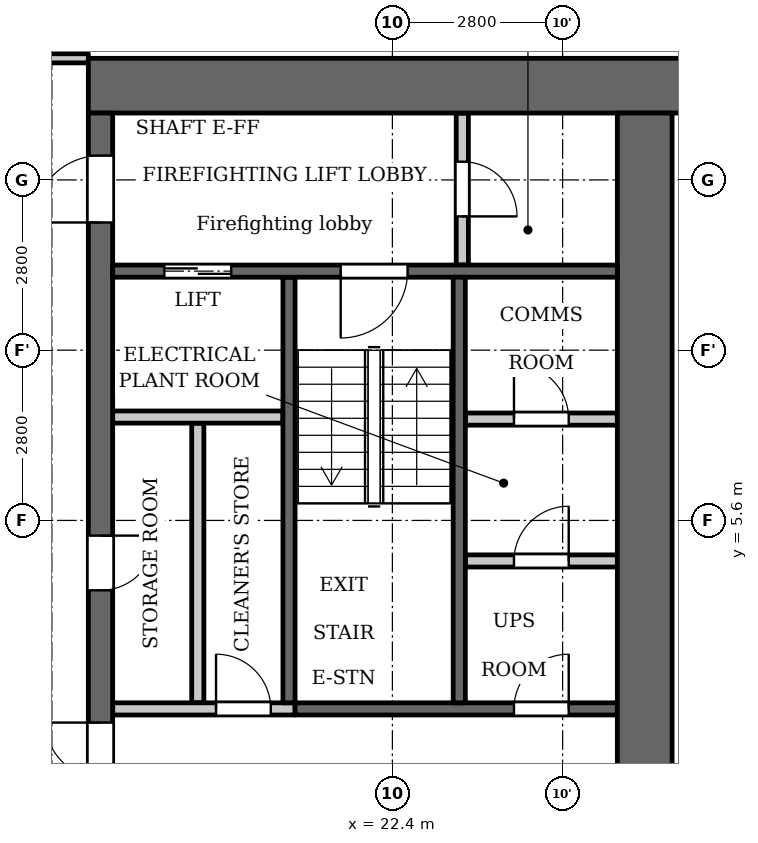
"""IFC4 building model, lengths in metres.
Left out: names, types, materials, properties, quantities, classifications, styles, units other than length and angle.
Written with IfcOpenShell. Run it as: python <this file> out.ifc"""

import sys

from ifc_helpers import new_model, si_unit, direction, frame, frame_2d, origin, place, context, subcontext, project, spatial, rectangle, extrude, element, fill, save


model = new_model("IFC4")
c1 = context("Model", 3, precision=1e-05, world=origin(), true_north=direction((0.0, 1.0)))
c2 = subcontext(c1, "Body", "Model", "MODEL_VIEW")
j1 = project(units=[si_unit("LENGTHUNIT", "METRE"), si_unit("PLANEANGLEUNIT", "RADIAN")], contexts=[c1])
p1 = place(None, origin())
s1 = spatial("IfcSite", under=j1, at=p1, CompositionType="ELEMENT")
p2 = place(p1, origin())
s2 = spatial("IfcBuilding", under=s1, at=p2, CompositionType="ELEMENT")
p3 = place(p2, frame((0.0, 0.0, 48.0)))
s3 = spatial("IfcBuildingStorey", under=s2, at=p3, CompositionType="ELEMENT", Elevation=48.0)
p4 = place(p3, frame((20.7, 2.6, 0.0), z_axis=(0.0, 0.0, 1.0), x_axis=(0.0, 1.0, 0.0)))
e1 = element("IfcWall", 1, at=p4, inside=s3, PredefinedType="SHEAR", context=c2, shape_type="SweptSolid", body=[
    extrude(rectangle(XDim=7.0, YDim=0.2, at=frame_2d((3.5, 0.0))), origin(), (0.0, 0.0, 1.0), 3.2),
])
p5 = place(p3, frame((20.8, 2.5, 0.0), z_axis=(0.0, 0.0, 1.0), x_axis=(1.0, 0.0, 0.0)))
e2 = element("IfcWall", 2, at=p5, inside=s3, PredefinedType="SHEAR", context=c2, shape_type="SweptSolid", body=[
    extrude(rectangle(XDim=5.3, YDim=0.2, at=frame_2d((2.65, 0.0))), origin(), (0.0, 0.0, 1.0), 3.2),
])
p6 = place(p5, frame((3.6, 0.0, 0.0)))
e3 = element("IfcOpeningElement", 3, at=p6, cuts=e2, PredefinedType="OPENING", context=c2, shape_type="SweptSolid", body=[
    extrude(rectangle(XDim=0.9, YDim=2.1, at=frame_2d((0.45, 1.05))), frame((0.0, 0.11, 0.0), z_axis=(0.0, -1.0, 0.0), x_axis=(1.0, 0.0, 0.0)), (0.0, 0.0, 1.0), 0.22),
])
p7 = place(p3, frame((17.4, 12.75, 0.0), z_axis=(0.0, 0.0, 1.0), x_axis=(1.0, 0.0, 0.0)))
e4 = element("IfcWall", 4, at=p7, inside=s3, PredefinedType="SHEAR", context=c2, shape_type="SweptSolid", body=[
    extrude(rectangle(XDim=10.4, YDim=0.9, at=frame_2d((5.2, 0.0))), origin(), (0.0, 0.0, 1.0), 3.2),
])
p8 = place(p3, frame((19.2, 2.6, 0.0), z_axis=(0.0, 0.0, 1.0), x_axis=(0.0, 1.0, 0.0)))
e5 = element("IfcWall", 5, at=p8, inside=s3, PredefinedType="PARTITIONING", context=c2, shape_type="SweptSolid", body=[
    extrude(rectangle(XDim=4.6, YDim=0.2, at=frame_2d((2.3, 0.0))), origin(), (0.0, 0.0, 1.0), 3.2),
])
p9 = place(p3, frame((17.6, -12.3, 0.0), z_axis=(0.0, 0.0, 1.0), x_axis=(0.0, 1.0, 0.0)))
e6 = element("IfcWall", 6, at=p9, inside=s3, PredefinedType="SHEAR", context=c2, shape_type="SweptSolid", body=[
    extrude(rectangle(XDim=24.6, YDim=0.4, at=frame_2d((12.3, 0.0))), origin(), (0.0, 0.0, 1.0), 3.2),
])
p10 = place(p9, frame((6.0, 0.0, 0.0)))
e7 = element("IfcOpeningElement", 7, at=p10, cuts=e6, PredefinedType="OPENING", context=c2, shape_type="SweptSolid", body=[
    extrude(rectangle(XDim=1.1, YDim=2.1, at=frame_2d((0.55, 1.05))), frame((0.0, 0.21, 0.0), z_axis=(0.0, -1.0, 0.0), x_axis=(1.0, 0.0, 0.0)), (0.0, 0.0, 1.0), 0.42),
])
p11 = place(p9, frame((8.4, 0.0, 0.0)))
e8 = element("IfcOpeningElement", 8, at=p11, cuts=e6, PredefinedType="OPENING", context=c2, shape_type="SweptSolid", body=[
    extrude(rectangle(XDim=1.1, YDim=2.1, at=frame_2d((0.55, 1.05))), frame((0.0, 0.21, 0.0), z_axis=(0.0, -1.0, 0.0), x_axis=(1.0, 0.0, 0.0)), (0.0, 0.0, 1.0), 0.42),
])
p12 = place(p9, frame((10.8, 0.0, 0.0)))
e9 = element("IfcOpeningElement", 9, at=p12, cuts=e6, PredefinedType="OPENING", context=c2, shape_type="SweptSolid", body=[
    extrude(rectangle(XDim=1.1, YDim=2.1, at=frame_2d((0.55, 1.05))), frame((0.0, 0.21, 0.0), z_axis=(0.0, -1.0, 0.0), x_axis=(1.0, 0.0, 0.0)), (0.0, 0.0, 1.0), 0.42),
])
p13 = place(p9, frame((16.75, 0.0, 0.0)))
e10 = element("IfcOpeningElement", 10, at=p13, cuts=e6, PredefinedType="OPENING", context=c2, shape_type="SweptSolid", body=[
    extrude(rectangle(XDim=0.9, YDim=2.1, at=frame_2d((0.45, 1.05))), frame((0.0, 0.21, 0.0), z_axis=(0.0, -1.0, 0.0), x_axis=(1.0, 0.0, 0.0)), (0.0, 0.0, 1.0), 0.42),
])
p14 = place(p9, frame((22.8, 0.0, 0.0)))
e11 = element("IfcOpeningElement", 11, at=p14, cuts=e6, PredefinedType="OPENING", context=c2, shape_type="SweptSolid", body=[
    extrude(rectangle(XDim=1.1, YDim=2.1, at=frame_2d((0.55, 1.05))), frame((0.0, 0.21, 0.0), z_axis=(0.0, -1.0, 0.0), x_axis=(1.0, 0.0, 0.0)), (0.0, 0.0, 1.0), 0.42),
])
p15 = place(p9, frame((0.7, 0.0, 0.0)))
e12 = element("IfcOpeningElement", 12, at=p15, cuts=e6, PredefinedType="OPENING", context=c2, shape_type="SweptSolid", body=[
    extrude(rectangle(XDim=1.1, YDim=2.1, at=frame_2d((0.55, 1.05))), frame((0.0, 0.21, 0.0), z_axis=(0.0, -1.0, 0.0), x_axis=(1.0, 0.0, 0.0)), (0.0, 0.0, 1.0), 0.42),
])
p16 = place(p9, frame((12.775, 0.0, 0.0)))
e13 = element("IfcOpeningElement", 13, at=p16, cuts=e6, PredefinedType="OPENING", context=c2, shape_type="SweptSolid", body=[
    extrude(rectangle(XDim=1.8, YDim=2.1, at=frame_2d((0.9, 1.05))), frame((0.0, 0.21, 0.0), z_axis=(0.0, -1.0, 0.0), x_axis=(1.0, 0.0, 0.0)), (0.0, 0.0, 1.0), 0.42),
])
p17 = place(p3, frame((26.55, -12.3, 0.0), z_axis=(0.0, 0.0, 1.0), x_axis=(0.0, 1.0, 0.0)))
e14 = element("IfcWall", 14, at=p17, inside=s3, PredefinedType="SHEAR", context=c2, shape_type="SweptSolid", body=[
    extrude(rectangle(XDim=24.6, YDim=0.9, at=frame_2d((12.3, 0.0))), origin(), (0.0, 0.0, 1.0), 3.2),
])
p18 = place(p3, frame((23.55, 9.8, 0.0), z_axis=(0.0, 0.0, 1.0), x_axis=(0.0, 1.0, 0.0)))
e15 = element("IfcWall", 15, at=p18, inside=s3, PredefinedType="PARTITIONING", context=c2, shape_type="SweptSolid", body=[
    extrude(rectangle(XDim=2.5, YDim=0.2, at=frame_2d((1.25, 0.0))), origin(), (0.0, 0.0, 1.0), 3.2),
])
p19 = place(p18, frame((0.8, 0.0, 0.0)))
e16 = element("IfcOpeningElement", 16, at=p19, cuts=e15, PredefinedType="OPENING", context=c2, shape_type="SweptSolid", body=[
    extrude(rectangle(XDim=0.9, YDim=2.1, at=frame_2d((0.45, 1.05))), frame((0.0, 0.11, 0.0), z_axis=(0.0, -1.0, 0.0), x_axis=(1.0, 0.0, 0.0)), (0.0, 0.0, 1.0), 0.22),
])
p20 = place(p3, frame((23.6, 4.933, 0.0), z_axis=(0.0, 0.0, 1.0), x_axis=(1.0, 0.0, 0.0)))
e17 = element("IfcWall", 17, at=p20, inside=s3, PredefinedType="PARTITIONING", context=c2, shape_type="SweptSolid", body=[
    extrude(rectangle(XDim=2.5, YDim=0.2, at=frame_2d((1.25, 0.0))), origin(), (0.0, 0.0, 1.0), 3.2),
])
p21 = place(p20, frame((0.8, 0.0, 0.0)))
e18 = element("IfcOpeningElement", 18, at=p21, cuts=e17, PredefinedType="OPENING", context=c2, shape_type="SweptSolid", body=[
    extrude(rectangle(XDim=0.9, YDim=2.1, at=frame_2d((0.45, 1.05))), frame((0.0, 0.11, 0.0), z_axis=(0.0, -1.0, 0.0), x_axis=(1.0, 0.0, 0.0)), (0.0, 0.0, 1.0), 0.22),
])
p22 = place(p3, frame((23.6, 7.267, 0.0), z_axis=(0.0, 0.0, 1.0), x_axis=(1.0, 0.0, 0.0)))
e19 = element("IfcWall", 19, at=p22, inside=s3, PredefinedType="PARTITIONING", context=c2, shape_type="SweptSolid", body=[
    extrude(rectangle(XDim=2.5, YDim=0.2, at=frame_2d((1.25, 0.0))), origin(), (0.0, 0.0, 1.0), 3.2),
])
p23 = place(p22, frame((0.8, 0.0, 0.0)))
e20 = element("IfcOpeningElement", 20, at=p23, cuts=e19, PredefinedType="OPENING", context=c2, shape_type="SweptSolid", body=[
    extrude(rectangle(XDim=0.9, YDim=2.1, at=frame_2d((0.45, 1.05))), frame((0.0, 0.11, 0.0), z_axis=(0.0, -1.0, 0.0), x_axis=(1.0, 0.0, 0.0)), (0.0, 0.0, 1.0), 0.22),
])
p24 = place(p3, frame((17.8, 2.5, 0.0), z_axis=(0.0, 0.0, 1.0), x_axis=(1.0, 0.0, 0.0)))
e21 = element("IfcWall", 21, at=p24, inside=s3, PredefinedType="PARTITIONING", context=c2, shape_type="SweptSolid", body=[
    extrude(rectangle(XDim=3.0, YDim=0.2, at=frame_2d((1.5, 0.0))), origin(), (0.0, 0.0, 1.0), 3.2),
])
p25 = place(p24, frame((1.7, 0.0, 0.0)))
e22 = element("IfcOpeningElement", 22, at=p25, cuts=e21, PredefinedType="OPENING", context=c2, shape_type="SweptSolid", body=[
    extrude(rectangle(XDim=0.9, YDim=2.1, at=frame_2d((0.45, 1.05))), frame((0.0, 0.11, 0.0), z_axis=(0.0, -1.0, 0.0), x_axis=(1.0, 0.0, 0.0)), (0.0, 0.0, 1.0), 0.22),
])
p26 = place(p3, frame((17.8, 7.3, 0.0), z_axis=(0.0, 0.0, 1.0), x_axis=(1.0, 0.0, 0.0)))
e23 = element("IfcWall", 23, at=p26, inside=s3, PredefinedType="PARTITIONING", context=c2, shape_type="SweptSolid", body=[
    extrude(rectangle(XDim=2.8, YDim=0.2, at=frame_2d((1.4, 0.0))), origin(), (0.0, 0.0, 1.0), 3.2),
])
p27 = place(p3, frame((17.8, 9.7, 0.0), z_axis=(0.0, 0.0, 1.0), x_axis=(1.0, 0.0, 0.0)))
e24 = element("IfcWall", 24, at=p27, inside=s3, PredefinedType="SHEAR", context=c2, shape_type="SweptSolid", body=[
    extrude(rectangle(XDim=8.3, YDim=0.2, at=frame_2d((4.15, 0.0))), origin(), (0.0, 0.0, 1.0), 3.2),
])
p28 = place(p27, frame((0.85, 0.0, 0.0)))
e25 = element("IfcOpeningElement", 25, at=p28, cuts=e24, PredefinedType="OPENING", context=c2, shape_type="SweptSolid", body=[
    extrude(rectangle(XDim=1.1, YDim=2.1, at=frame_2d((0.55, 1.05))), frame((0.0, 0.11, 0.0), z_axis=(0.0, -1.0, 0.0), x_axis=(1.0, 0.0, 0.0)), (0.0, 0.0, 1.0), 0.22),
])
p29 = place(p27, frame((3.75, 0.0, 0.0)))
e26 = element("IfcOpeningElement", 26, at=p29, cuts=e24, PredefinedType="OPENING", context=c2, shape_type="SweptSolid", body=[
    extrude(rectangle(XDim=1.1, YDim=2.1, at=frame_2d((0.55, 1.05))), frame((0.0, 0.11, 0.0), z_axis=(0.0, -1.0, 0.0), x_axis=(1.0, 0.0, 0.0)), (0.0, 0.0, 1.0), 0.22),
])
p30 = place(p3, frame((23.5, 2.6, 0.0), z_axis=(0.0, 0.0, 1.0), x_axis=(0.0, 1.0, 0.0)))
e27 = element("IfcWall", 27, at=p30, inside=s3, PredefinedType="SHEAR", context=c2, shape_type="SweptSolid", body=[
    extrude(rectangle(XDim=7.0, YDim=0.2, at=frame_2d((3.5, 0.0))), origin(), (0.0, 0.0, 1.0), 3.2),
])
p31 = place(p3, frame((-17.4, 13.2, 0.0), z_axis=(0.0, 0.0, 1.0), x_axis=(1.0, 0.0, 0.0)))
e28 = element("IfcWall", 28, at=p31, inside=s3, PredefinedType="PARTITIONING", context=c2, shape_type="SweptSolid", body=[
    extrude(rectangle(XDim=34.8, YDim=0.15, at=frame_2d((17.4, 0.0))), origin(), (0.0, 0.0, 1.0), 3.2),
])
p32 = place(p31, frame((0.75, 0.0, 0.0)))
e29 = element("IfcOpeningElement", 29, at=p32, cuts=e28, PredefinedType="OPENING", context=c2, shape_type="SweptSolid", body=[
    extrude(rectangle(XDim=1.0, YDim=2.1, at=frame_2d((0.5, 1.05))), frame((0.0, 0.085, 0.0), z_axis=(0.0, -1.0, 0.0), x_axis=(1.0, 0.0, 0.0)), (0.0, 0.0, 1.0), 0.17),
])
p33 = place(p31, frame((33.15, 0.0, 0.0)))
e30 = element("IfcOpeningElement", 30, at=p33, cuts=e28, PredefinedType="OPENING", context=c2, shape_type="SweptSolid", body=[
    extrude(rectangle(XDim=1.0, YDim=2.1, at=frame_2d((0.5, 1.05))), frame((0.0, 0.085, 0.0), z_axis=(0.0, -1.0, 0.0), x_axis=(1.0, 0.0, 0.0)), (0.0, 0.0, 1.0), 0.17),
])
p34 = place(p31, frame((3.05, 0.0, 0.0)))
e31 = element("IfcOpeningElement", 31, at=p34, cuts=e28, PredefinedType="OPENING", context=c2, shape_type="SweptSolid", body=[
    extrude(rectangle(XDim=1.0, YDim=2.1, at=frame_2d((0.5, 1.05))), frame((0.0, 0.085, 0.0), z_axis=(0.0, -1.0, 0.0), x_axis=(1.0, 0.0, 0.0)), (0.0, 0.0, 1.0), 0.17),
])
p35 = place(p31, frame((12.45, 0.0, 0.0)))
e32 = element("IfcOpeningElement", 32, at=p35, cuts=e28, PredefinedType="OPENING", context=c2, shape_type="SweptSolid", body=[
    extrude(rectangle(XDim=1.0, YDim=2.1, at=frame_2d((0.5, 1.05))), frame((0.0, 0.085, 0.0), z_axis=(0.0, -1.0, 0.0), x_axis=(1.0, 0.0, 0.0)), (0.0, 0.0, 1.0), 0.17),
])
p36 = place(p31, frame((18.3, 0.0, 0.0)))
e33 = element("IfcOpeningElement", 33, at=p36, cuts=e28, PredefinedType="OPENING", context=c2, shape_type="SweptSolid", body=[
    extrude(rectangle(XDim=1.0, YDim=2.1, at=frame_2d((0.5, 1.05))), frame((0.0, 0.085, 0.0), z_axis=(0.0, -1.0, 0.0), x_axis=(1.0, 0.0, 0.0)), (0.0, 0.0, 1.0), 0.17),
])
p37 = place(p31, frame((29.25, 0.0, 0.0)))
e34 = element("IfcOpeningElement", 34, at=p37, cuts=e28, PredefinedType="OPENING", context=c2, shape_type="SweptSolid", body=[
    extrude(rectangle(XDim=1.0, YDim=2.1, at=frame_2d((0.5, 1.05))), frame((0.0, 0.085, 0.0), z_axis=(0.0, -1.0, 0.0), x_axis=(1.0, 0.0, 0.0)), (0.0, 0.0, 1.0), 0.17),
])
p38 = place(p13, origin())
e35 = element("IfcDoor", 35, at=p38, inside=s3, OperationType="SINGLE_SWING_RIGHT", PredefinedType="DOOR", context=c2, shape_type="SweptSolid", body=[
    extrude(rectangle(XDim=0.9, YDim=2.1, at=frame_2d((0.45, 1.05))), frame((0.0, 0.025, 0.0), z_axis=(0.0, -1.0, 0.0), x_axis=(1.0, 0.0, 0.0)), (0.0, 0.0, 1.0), 0.05),
])
fill(e10, e35)
p39 = place(p25, origin())
e36 = element("IfcDoor", 36, at=p39, inside=s3, OperationType="SINGLE_SWING_RIGHT", PredefinedType="DOOR", context=c2, shape_type="SweptSolid", body=[
    extrude(rectangle(XDim=0.9, YDim=2.1, at=frame_2d((0.45, 1.05))), frame((0.0, 0.025, 0.0), z_axis=(0.0, -1.0, 0.0), x_axis=(1.0, 0.0, 0.0)), (0.0, 0.0, 1.0), 0.05),
])
fill(e22, e36)
p40 = place(p28, origin())
e37 = element("IfcDoor", 37, at=p40, inside=s3, OperationType="DOUBLE_DOOR_SLIDING", PredefinedType="DOOR", context=c2, shape_type="SweptSolid", body=[
    extrude(rectangle(XDim=1.1, YDim=2.1, at=frame_2d((0.55, 1.05))), frame((0.0, 0.025, 0.0), z_axis=(0.0, -1.0, 0.0), x_axis=(1.0, 0.0, 0.0)), (0.0, 0.0, 1.0), 0.05),
])
fill(e25, e37)
p41 = place(p14, origin())
e38 = element("IfcDoor", 38, at=p41, inside=s3, OperationType="SINGLE_SWING_RIGHT", PredefinedType="DOOR", context=c2, shape_type="SweptSolid", body=[
    extrude(rectangle(XDim=1.1, YDim=2.1, at=frame_2d((0.55, 1.05))), frame((0.0, 0.025, 0.0), z_axis=(0.0, -1.0, 0.0), x_axis=(1.0, 0.0, 0.0)), (0.0, 0.0, 1.0), 0.05),
])
fill(e11, e38)
p42 = place(p19, origin())
e39 = element("IfcDoor", 39, at=p42, inside=s3, OperationType="SINGLE_SWING_LEFT", PredefinedType="DOOR", context=c2, shape_type="SweptSolid", body=[
    extrude(rectangle(XDim=0.9, YDim=2.1, at=frame_2d((0.45, 1.05))), frame((0.0, 0.025, 0.0), z_axis=(0.0, -1.0, 0.0), x_axis=(1.0, 0.0, 0.0)), (0.0, 0.0, 1.0), 0.05),
])
fill(e16, e39)
p43 = place(p29, origin())
e40 = element("IfcDoor", 40, at=p43, inside=s3, OperationType="SINGLE_SWING_LEFT", PredefinedType="DOOR", context=c2, shape_type="SweptSolid", body=[
    extrude(rectangle(XDim=1.1, YDim=2.1, at=frame_2d((0.55, 1.05))), frame((0.0, 0.025, 0.0), z_axis=(0.0, -1.0, 0.0), x_axis=(1.0, 0.0, 0.0)), (0.0, 0.0, 1.0), 0.05),
])
fill(e26, e40)
p44 = place(p16, origin())
e41 = element("IfcDoor", 41, at=p44, inside=s3, OperationType="DOUBLE_DOOR_SINGLE_SWING", PredefinedType="DOOR", context=c2, shape_type="SweptSolid", body=[
    extrude(rectangle(XDim=1.8, YDim=2.1, at=frame_2d((0.9, 1.05))), frame((0.0, 0.025, 0.0), z_axis=(0.0, -1.0, 0.0), x_axis=(1.0, 0.0, 0.0)), (0.0, 0.0, 1.0), 0.05),
])
fill(e13, e41)
p45 = place(p21, origin())
e42 = element("IfcDoor", 42, at=p45, inside=s3, OperationType="SINGLE_SWING_LEFT", PredefinedType="DOOR", context=c2, shape_type="SweptSolid", body=[
    extrude(rectangle(XDim=0.9, YDim=2.1, at=frame_2d((0.45, 1.05))), frame((0.0, 0.025, 0.0), z_axis=(0.0, -1.0, 0.0), x_axis=(1.0, 0.0, 0.0)), (0.0, 0.0, 1.0), 0.05),
])
fill(e18, e42)
p46 = place(p23, origin())
e43 = element("IfcDoor", 43, at=p46, inside=s3, OperationType="SINGLE_SWING_RIGHT", PredefinedType="DOOR", context=c2, shape_type="SweptSolid", body=[
    extrude(rectangle(XDim=0.9, YDim=2.1, at=frame_2d((0.45, 1.05))), frame((0.0, 0.025, 0.0), z_axis=(0.0, -1.0, 0.0), x_axis=(1.0, 0.0, 0.0)), (0.0, 0.0, 1.0), 0.05),
])
fill(e20, e43)
p47 = place(p6, origin())
e44 = element("IfcDoor", 44, at=p47, inside=s3, OperationType="SINGLE_SWING_LEFT", PredefinedType="DOOR", context=c2, shape_type="SweptSolid", body=[
    extrude(rectangle(XDim=0.9, YDim=2.1, at=frame_2d((0.45, 1.05))), frame((0.0, 0.025, 0.0), z_axis=(0.0, -1.0, 0.0), x_axis=(1.0, 0.0, 0.0)), (0.0, 0.0, 1.0), 0.05),
])
fill(e3, e44)
save(model, sys.argv[1])
